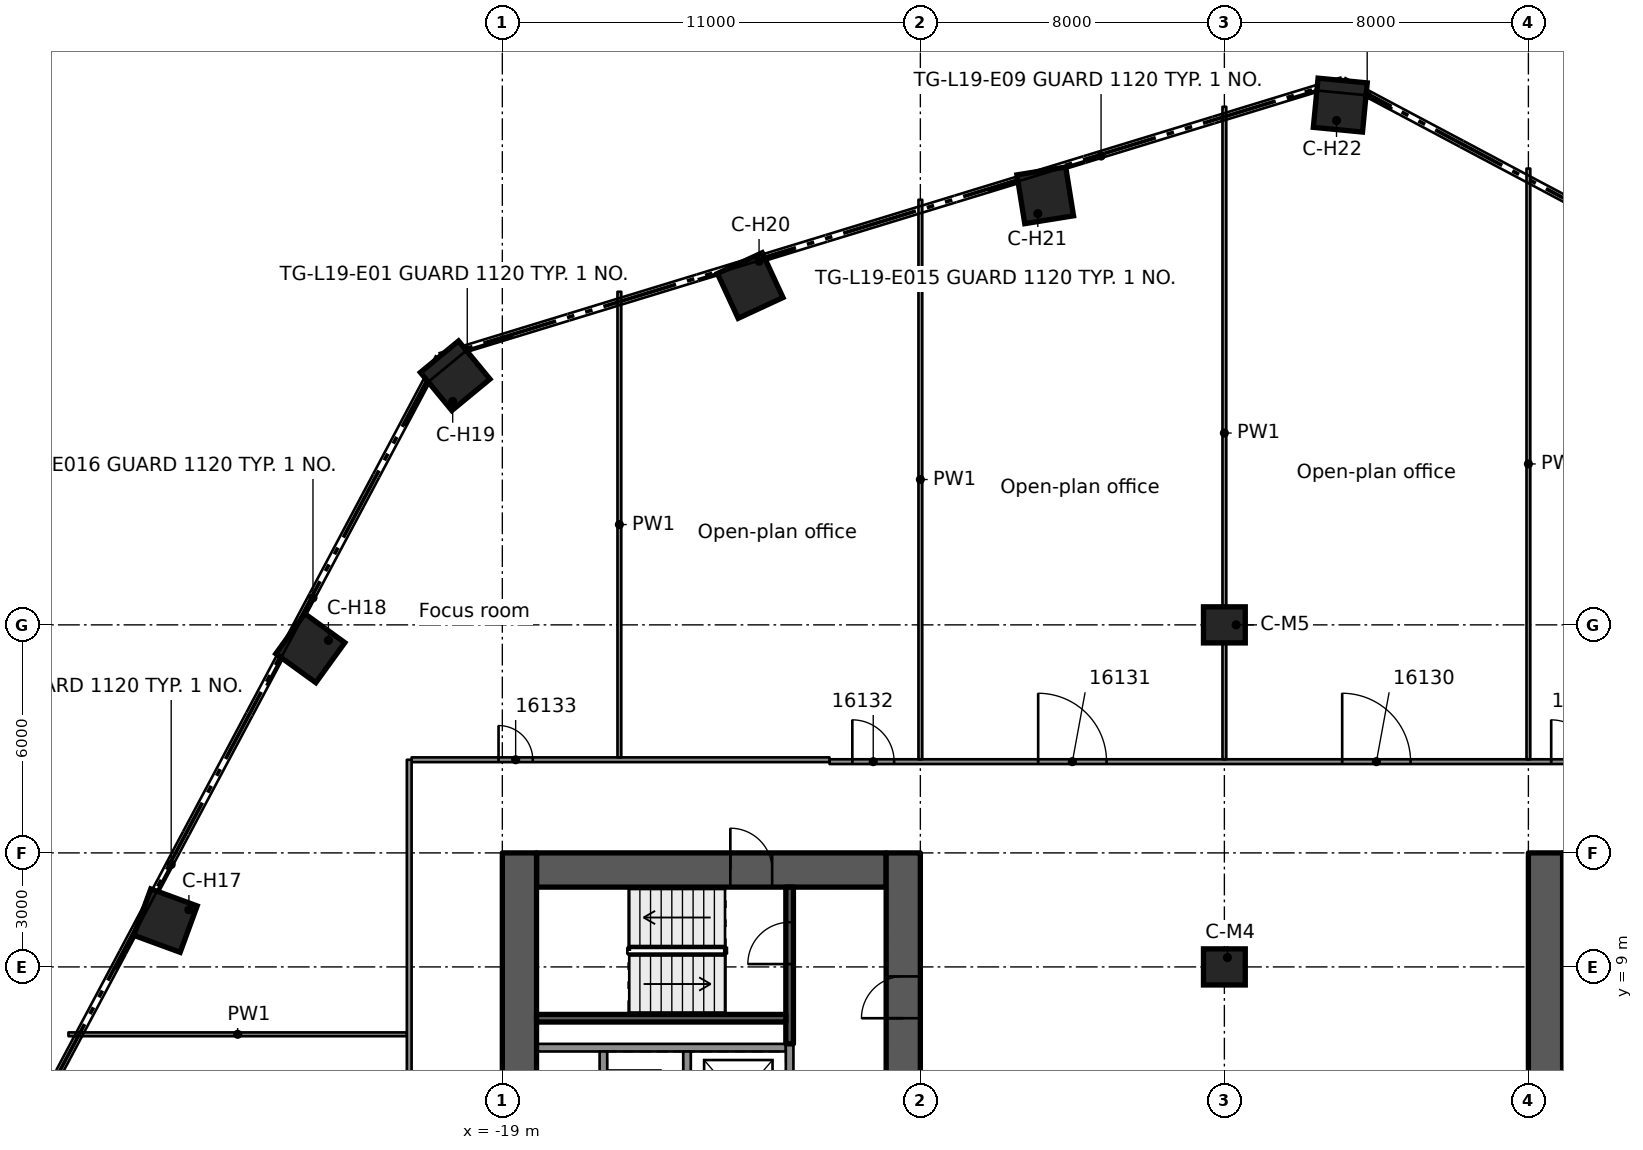
"""IFC4 building model, lengths in metres.
Left out: names, types, materials, properties, quantities, classifications, styles, units other than length and angle.
Written with IfcOpenShell. Run it as: python <this file> out.ifc"""

import sys

from ifc_helpers import new_model, si_unit, direction, frame, frame_2d, origin, origin_2d, place, context, subcontext, project, spatial, rectangle, extrude, element, fill, save


model = new_model("IFC4")
c1 = context("Model", 3, precision=1e-05, world=origin(), true_north=direction((0.0, 1.0)))
c2 = subcontext(c1, "Body", "Model", "MODEL_VIEW")
j1 = project(units=[si_unit("LENGTHUNIT", "METRE"), si_unit("PLANEANGLEUNIT", "RADIAN")], contexts=[c1])
p1 = place(None, origin())
s1 = spatial("IfcSite", under=j1, at=p1, CompositionType="ELEMENT")
p2 = place(p1, origin())
s2 = spatial("IfcBuilding", under=s1, at=p2, CompositionType="ELEMENT")
p3 = place(p2, frame((0.0, 0.0, 80.7)))
s3 = spatial("IfcBuildingStorey", under=s2, at=p3, CompositionType="ELEMENT", Elevation=80.7)
p4 = place(p3, frame((-18.1, 11.55, 0.0), z_axis=(0.0, 0.0, 1.0), x_axis=(1.0, 0.0, 0.0)))
e1 = element("IfcWall", 1, at=p4, inside=s3, PredefinedType="SHEAR", context=c2, shape_type="SweptSolid", body=[
    extrude(rectangle(XDim=9.2, YDim=0.9, at=frame_2d((4.6, 0.0))), origin(), (0.0, 0.0, 1.0), 3.5),
])
p5 = place(p4, frame((5.1, 0.0, 0.0)))
e2 = element("IfcOpeningElement", 2, at=p5, cuts=e1, PredefinedType="OPENING", context=c2, shape_type="SweptSolid", body=[
    extrude(rectangle(XDim=1.1, YDim=2.1, at=frame_2d((0.55, 1.05))), frame((0.0, 0.46, 0.0), z_axis=(0.0, -1.0, 0.0), x_axis=(1.0, 0.0, 0.0)), (0.0, 0.0, 1.0), 0.92),
])
p6 = place(p3, frame((-18.55, -12.0, 0.0), z_axis=(0.0, 0.0, 1.0), x_axis=(0.0, 1.0, 0.0)))
e3 = element("IfcWall", 3, at=p6, inside=s3, PredefinedType="SHEAR", context=c2, shape_type="SweptSolid", body=[
    extrude(rectangle(XDim=24.0, YDim=0.9, at=frame_2d((12.0, 0.0))), origin(), (0.0, 0.0, 1.0), 3.5),
])
p7 = place(p6, frame((10.1, 0.0, 0.0)))
e4 = element("IfcOpeningElement", 4, at=p7, cuts=e3, PredefinedType="OPENING", context=c2, shape_type="SweptSolid", body=[
    extrude(rectangle(XDim=1.8, YDim=2.1, at=frame_2d((0.9, 1.05))), frame((0.0, 0.46, 0.0), z_axis=(0.0, -1.0, 0.0), x_axis=(1.0, 0.0, 0.0)), (0.0, 0.0, 1.0), 0.92),
])
p8 = place(p3, frame((-8.45, -12.0, 0.0), z_axis=(0.0, 0.0, 1.0), x_axis=(0.0, 1.0, 0.0)))
e5 = element("IfcWall", 5, at=p8, inside=s3, PredefinedType="SHEAR", context=c2, shape_type="SweptSolid", body=[
    extrude(rectangle(XDim=24.0, YDim=0.9, at=frame_2d((12.0, 0.0))), origin(), (0.0, 0.0, 1.0), 3.5),
])
p9 = place(p8, frame((9.6, 0.0, 0.0)))
e6 = element("IfcOpeningElement", 6, at=p9, cuts=e5, PredefinedType="OPENING", context=c2, shape_type="SweptSolid", body=[
    extrude(rectangle(XDim=1.8, YDim=2.1, at=frame_2d((0.9, 1.05))), frame((0.0, 0.46, 0.0), z_axis=(0.0, -1.0, 0.0), x_axis=(1.0, 0.0, 0.0)), (0.0, 0.0, 1.0), 0.92),
])
p10 = place(p8, frame((19.65, 0.0, 0.0)))
e7 = element("IfcOpeningElement", 7, at=p10, cuts=e5, PredefinedType="OPENING", context=c2, shape_type="SweptSolid", body=[
    extrude(rectangle(XDim=1.1, YDim=2.1, at=frame_2d((0.55, 1.05))), frame((0.0, 0.46, 0.0), z_axis=(0.0, -1.0, 0.0), x_axis=(1.0, 0.0, 0.0)), (0.0, 0.0, 1.0), 0.92),
])
p11 = place(p3, frame((8.9, 11.55, 0.0), z_axis=(0.0, 0.0, 1.0), x_axis=(1.0, 0.0, 0.0)))
e8 = element("IfcWall", 8, at=p11, inside=s3, PredefinedType="SHEAR", context=c2, shape_type="SweptSolid", body=[
    extrude(rectangle(XDim=9.2, YDim=0.9, at=frame_2d((4.6, 0.0))), origin(), (0.0, 0.0, 1.0), 3.5),
])
p12 = place(p11, frame((3.0, 0.0, 0.0)))
e9 = element("IfcOpeningElement", 9, at=p12, cuts=e8, PredefinedType="OPENING", context=c2, shape_type="SweptSolid", body=[
    extrude(rectangle(XDim=1.1, YDim=2.1, at=frame_2d((0.55, 1.05))), frame((0.0, 0.46, 0.0), z_axis=(0.0, -1.0, 0.0), x_axis=(1.0, 0.0, 0.0)), (0.0, 0.0, 1.0), 0.92),
])
p13 = place(p3, frame((8.45, -12.0, 0.0), z_axis=(0.0, 0.0, 1.0), x_axis=(0.0, 1.0, 0.0)))
e10 = element("IfcWall", 10, at=p13, inside=s3, PredefinedType="SHEAR", context=c2, shape_type="SweptSolid", body=[
    extrude(rectangle(XDim=24.0, YDim=0.9, at=frame_2d((12.0, 0.0))), origin(), (0.0, 0.0, 1.0), 3.5),
])
p14 = place(p13, frame((12.6, 0.0, 0.0)))
e11 = element("IfcOpeningElement", 11, at=p14, cuts=e10, PredefinedType="OPENING", context=c2, shape_type="SweptSolid", body=[
    extrude(rectangle(XDim=1.8, YDim=2.1, at=frame_2d((0.9, 1.05))), frame((0.0, 0.46, 0.0), z_axis=(0.0, -1.0, 0.0), x_axis=(1.0, 0.0, 0.0)), (0.0, 0.0, 1.0), 0.92),
])
p15 = place(p13, frame((3.25, 0.0, 0.0)))
e12 = element("IfcOpeningElement", 12, at=p15, cuts=e10, PredefinedType="OPENING", context=c2, shape_type="SweptSolid", body=[
    extrude(rectangle(XDim=1.1, YDim=2.1, at=frame_2d((0.55, 1.05))), frame((0.0, 0.46, 0.0), z_axis=(0.0, -1.0, 0.0), x_axis=(1.0, 0.0, 0.0)), (0.0, 0.0, 1.0), 0.92),
])
for number, where, z_axis, x_axis in (
    (13, (-27.864, 10.218, 0.0), (0.0, 0.0, 1.0), (-0.939, 0.344, 0.0)),
    (14, (-24.053, 17.387, 0.0), (0.0, 0.0, 1.0), (-0.81, 0.586, 0.0)),
    (15, (-20.241, 24.555, 0.0), (0.0, 0.0, 1.0), (-0.636, 0.772, 0.0)),
    (16, (-12.478, 26.929, 0.0), (0.0, 0.0, 1.0), (-0.42, 0.907, 0.0)),
    (17, (-4.714, 29.302, 0.0), (0.0, 0.0, 1.0), (-0.159, 0.987, 0.0)),
    (18, (3.05, 31.676, 0.0), (0.0, 0.0, 1.0), (0.096, 0.995, 0.0)),
):
    element("IfcColumn", number, at=place(p3, frame(where, z_axis=z_axis, x_axis=x_axis)), inside=s3, PredefinedType="COLUMN", context=c2, shape_type="SweptSolid", body=[
        extrude(rectangle(XDim=1.3, YDim=1.3, at=origin_2d()), origin(), (0.0, 0.0, 1.0), 3.5),
    ])
for number, where, z_axis, x_axis in (
    (19, (0.0, 9.0, 0.0), (0.0, 0.0, 1.0), (1.0, 0.0, 0.0)),
    (20, (0.0, 18.0, 0.0), (0.0, 0.0, 1.0), (1.0, 0.0, 0.0)),
):
    element("IfcColumn", number, at=place(p3, frame(where, z_axis=z_axis, x_axis=x_axis)), inside=s3, PredefinedType="COLUMN", context=c2, shape_type="SweptSolid", body=[
        extrude(rectangle(XDim=1.1, YDim=0.95, at=origin_2d()), origin(), (0.0, 0.0, 1.0), 3.5),
    ])
p16 = place(p3, frame((-11.54, 6.875, 0.0), z_axis=(0.0, 0.0, 1.0), x_axis=(-1.0, 0.0, 0.0)))
e21 = element("IfcWall", 21, at=p16, inside=s3, PredefinedType="SOLIDWALL", context=c2, shape_type="SweptSolid", body=[
    extrude(rectangle(XDim=6.56, YDim=0.2, at=frame_2d((3.28, 0.0))), origin(), (0.0, 0.0, 1.0), 3.09),
])
p17 = place(p3, frame((-11.44, -6.975, 0.0), z_axis=(0.0, 0.0, 1.0), x_axis=(0.0, 1.0, 0.0)))
e22 = element("IfcWall", 22, at=p17, inside=s3, PredefinedType="SOLIDWALL", context=c2, shape_type="SweptSolid", body=[
    extrude(rectangle(XDim=13.95, YDim=0.2, at=frame_2d((6.975, 0.0))), origin(), (0.0, 0.0, 1.0), 3.09),
])
p18 = place(p17, frame((6.425, 0.0, 0.0)))
e23 = element("IfcOpeningElement", 23, at=p18, cuts=e22, PredefinedType="OPENING", context=c2, shape_type="SweptSolid", body=[
    extrude(rectangle(XDim=1.1, YDim=2.1, at=frame_2d((0.55, 1.05))), frame((0.0, 0.11, 0.0), z_axis=(0.0, -1.0, 0.0), x_axis=(1.0, 0.0, 0.0)), (0.0, 0.0, 1.0), 0.22),
])
p19 = place(p17, frame((9.175, 0.0, 0.0)))
e24 = element("IfcOpeningElement", 24, at=p19, cuts=e22, PredefinedType="OPENING", context=c2, shape_type="SweptSolid", body=[
    extrude(rectangle(XDim=1.1, YDim=2.1, at=frame_2d((0.55, 1.05))), frame((0.0, 0.11, 0.0), z_axis=(0.0, -1.0, 0.0), x_axis=(1.0, 0.0, 0.0)), (0.0, 0.0, 1.0), 0.22),
])
p20 = place(p17, frame((11.925, 0.0, 0.0)))
e25 = element("IfcOpeningElement", 25, at=p20, cuts=e22, PredefinedType="OPENING", context=c2, shape_type="SweptSolid", body=[
    extrude(rectangle(XDim=1.1, YDim=2.1, at=frame_2d((0.55, 1.05))), frame((0.0, 0.11, 0.0), z_axis=(0.0, -1.0, 0.0), x_axis=(1.0, 0.0, 0.0)), (0.0, 0.0, 1.0), 0.22),
])
p21 = place(p17, frame((1.075, 0.0, 0.0)))
e26 = element("IfcOpeningElement", 26, at=p21, cuts=e22, PredefinedType="OPENING", context=c2, shape_type="SweptSolid", body=[
    extrude(rectangle(XDim=0.8, YDim=2.1, at=frame_2d((0.4, 1.05))), frame((0.0, 0.11, 0.0), z_axis=(0.0, -1.0, 0.0), x_axis=(1.0, 0.0, 0.0)), (0.0, 0.0, 1.0), 0.22),
])
p22 = place(p3, frame((-14.14, 4.225, 0.0), z_axis=(0.0, 0.0, 1.0), x_axis=(0.0, 1.0, 0.0)))
e27 = element("IfcWall", 27, at=p22, inside=s3, PredefinedType="SOLIDWALL", context=c2, shape_type="SweptSolid", body=[
    extrude(rectangle(XDim=2.55, YDim=0.2, at=frame_2d((1.275, 0.0))), origin(), (0.0, 0.0, 1.0), 3.09),
])
p23 = place(p3, frame((-16.34, 4.025, 0.0), z_axis=(0.0, 0.0, 1.0), x_axis=(0.0, 1.0, 0.0)))
e28 = element("IfcWall", 28, at=p23, inside=s3, PredefinedType="SOLIDWALL", context=c2, shape_type="SweptSolid", body=[
    extrude(rectangle(XDim=2.75, YDim=0.2, at=frame_2d((1.375, 0.0))), origin(), (0.0, 0.0, 1.0), 3.09),
])
p24 = place(p23, frame((0.925, 0.0, 0.0)))
e29 = element("IfcOpeningElement", 29, at=p24, cuts=e28, PredefinedType="OPENING", context=c2, shape_type="SweptSolid", body=[
    extrude(rectangle(XDim=1.1, YDim=2.1, at=frame_2d((0.55, 1.05))), frame((0.0, 0.11, 0.0), z_axis=(0.0, -1.0, 0.0), x_axis=(1.0, 0.0, 0.0)), (0.0, 0.0, 1.0), 0.22),
])
p25 = place(p3, frame((-11.44, 6.975, 0.0), z_axis=(0.0, 0.0, 1.0), x_axis=(0.0, 1.0, 0.0)))
e30 = element("IfcWall", 30, at=p25, inside=s3, PredefinedType="SOLIDWALL", context=c2, shape_type="SweptSolid", body=[
    extrude(rectangle(XDim=4.125, YDim=0.2, at=frame_2d((2.062, 0.0))), origin(), (0.0, 0.0, 1.0), 3.09),
])
p26 = place(p25, frame((2.1, 0.0, 0.0)))
e31 = element("IfcOpeningElement", 31, at=p26, cuts=e30, PredefinedType="OPENING", context=c2, shape_type="SweptSolid", body=[
    extrude(rectangle(XDim=1.1, YDim=2.1, at=frame_2d((0.55, 1.05))), frame((0.0, 0.11, 0.0), z_axis=(0.0, -1.0, 0.0), x_axis=(1.0, 0.0, 0.0)), (0.0, 0.0, 1.0), 0.22),
])
p27 = place(p3, frame((-11.54, 7.65, 0.0), z_axis=(0.0, 0.0, 1.0), x_axis=(-1.0, 0.0, 0.0)))
e32 = element("IfcWall", 32, at=p27, inside=s3, PredefinedType="SOLIDWALL", context=c2, shape_type="SweptSolid", body=[
    extrude(rectangle(XDim=6.56, YDim=0.2, at=frame_2d((3.28, 0.0))), origin(), (0.0, 0.0, 1.0), 3.09),
])
p28 = place(p3, frame((8.9, 6.875, 0.0), z_axis=(0.0, 0.0, 1.0), x_axis=(1.0, 0.0, 0.0)))
e33 = element("IfcWall", 33, at=p28, inside=s3, PredefinedType="PARTITIONING", context=c2, shape_type="SweptSolid", body=[
    extrude(rectangle(XDim=2.44, YDim=0.2, at=frame_2d((1.22, 0.0))), origin(), (0.0, 0.0, 1.0), 3.09),
])
p29 = place(p28, frame((0.72, 0.0, 0.0)))
e34 = element("IfcOpeningElement", 34, at=p29, cuts=e33, PredefinedType="OPENING", context=c2, shape_type="SweptSolid", body=[
    extrude(rectangle(XDim=1.0, YDim=2.1, at=frame_2d((0.5, 1.05))), frame((0.0, 0.11, 0.0), z_axis=(0.0, -1.0, 0.0), x_axis=(1.0, 0.0, 0.0)), (0.0, 0.0, 1.0), 0.22),
])
p30 = place(p3, frame((-30.417, 7.227, 0.0), z_axis=(0.0, 0.0, 1.0), x_axis=(1.0, 0.0, 0.0)))
e35 = element("IfcWall", 35, at=p30, inside=s3, PredefinedType="PARTITIONING", context=c2, shape_type="SweptSolid", body=[
    extrude(rectangle(XDim=8.905, YDim=0.1, at=frame_2d((4.453, 0.0))), origin(), (0.0, 0.0, 1.0), 3.08),
])
p31 = place(p3, frame((-10.39, 14.401, 0.0), z_axis=(0.0, 0.0, 1.0), x_axis=(1.0, 0.0, 0.0)))
e36 = element("IfcWall", 36, at=p31, inside=s3, PredefinedType="PARTITIONING", context=c2, shape_type="SweptSolid", body=[
    extrude(rectangle(XDim=20.781, YDim=0.125, at=frame_2d((10.391, 0.0))), origin(), (0.0, 0.0, 1.0), 3.08),
])
p32 = place(p31, frame((18.99, 0.0, 0.0)))
e37 = element("IfcOpeningElement", 37, at=p32, cuts=e36, PredefinedType="OPENING", context=c2, shape_type="SweptSolid", body=[
    extrude(rectangle(XDim=1.1, YDim=2.1, at=frame_2d((0.55, 1.05))), frame((0.0, 0.073, 0.0), z_axis=(0.0, -1.0, 0.0), x_axis=(1.0, 0.0, 0.0)), (0.0, 0.0, 1.0), 0.145),
])
p33 = place(p31, frame((13.49, 0.0, 0.0)))
e38 = element("IfcOpeningElement", 38, at=p33, cuts=e36, PredefinedType="OPENING", context=c2, shape_type="SweptSolid", body=[
    extrude(rectangle(XDim=1.8, YDim=2.1, at=frame_2d((0.9, 1.05))), frame((0.0, 0.073, 0.0), z_axis=(0.0, -1.0, 0.0), x_axis=(1.0, 0.0, 0.0)), (0.0, 0.0, 1.0), 0.145),
])
p34 = place(p31, frame((5.49, 0.0, 0.0)))
e39 = element("IfcOpeningElement", 39, at=p34, cuts=e36, PredefinedType="OPENING", context=c2, shape_type="SweptSolid", body=[
    extrude(rectangle(XDim=1.8, YDim=2.1, at=frame_2d((0.9, 1.05))), frame((0.0, 0.073, 0.0), z_axis=(0.0, -1.0, 0.0), x_axis=(1.0, 0.0, 0.0)), (0.0, 0.0, 1.0), 0.145),
])
p35 = place(p31, frame((0.6, 0.0, 0.0)))
e40 = element("IfcOpeningElement", 40, at=p35, cuts=e36, PredefinedType="OPENING", context=c2, shape_type="SweptSolid", body=[
    extrude(rectangle(XDim=1.1, YDim=2.1, at=frame_2d((0.55, 1.05))), frame((0.0, 0.073, 0.0), z_axis=(0.0, -1.0, 0.0), x_axis=(1.0, 0.0, 0.0)), (0.0, 0.0, 1.0), 0.145),
])
p36 = place(p3, frame((-21.387, 14.451, 0.0), z_axis=(0.0, 0.0, 1.0), x_axis=(1.0, 0.0, 0.0)))
e41 = element("IfcWall", 41, at=p36, inside=s3, PredefinedType="PARTITIONING", context=c2, shape_type="SweptSolid", body=[
    extrude(rectangle(XDim=10.996, YDim=0.125, at=frame_2d((5.498, 0.0))), origin(), (0.0, 0.0, 1.0), 3.08),
])
p37 = place(p36, frame((2.288, 0.0, 0.0)))
e42 = element("IfcOpeningElement", 42, at=p37, cuts=e41, PredefinedType="OPENING", context=c2, shape_type="SweptSolid", body=[
    extrude(rectangle(XDim=0.9, YDim=2.1, at=frame_2d((0.45, 1.05))), frame((0.0, 0.073, 0.0), z_axis=(0.0, -1.0, 0.0), x_axis=(1.0, 0.0, 0.0)), (0.0, 0.0, 1.0), 0.145),
])
p38 = place(p3, frame((8.0, 14.463, 0.0), z_axis=(0.0, 0.0, 1.0), x_axis=(0.0, 1.0, 0.0)))
e43 = element("IfcWall", 43, at=p38, inside=s3, PredefinedType="PARTITIONING", context=c2, shape_type="SweptSolid", body=[
    extrude(rectangle(XDim=15.543, YDim=0.1, at=frame_2d((7.771, 0.0))), origin(), (0.0, 0.0, 1.0), 3.08),
])
p39 = place(p3, frame((0.0, 14.463, 0.0), z_axis=(0.0, 0.0, 1.0), x_axis=(0.0, 1.0, 0.0)))
e44 = element("IfcWall", 44, at=p39, inside=s3, PredefinedType="PARTITIONING", context=c2, shape_type="SweptSolid", body=[
    extrude(rectangle(XDim=17.169, YDim=0.1, at=frame_2d((8.584, 0.0))), origin(), (0.0, 0.0, 1.0), 3.08),
])
p40 = place(p3, frame((-8.0, 14.463, 0.0), z_axis=(0.0, 0.0, 1.0), x_axis=(0.0, 1.0, 0.0)))
e45 = element("IfcWall", 45, at=p40, inside=s3, PredefinedType="PARTITIONING", context=c2, shape_type="SweptSolid", body=[
    extrude(rectangle(XDim=14.723, YDim=0.1, at=frame_2d((7.362, 0.0))), origin(), (0.0, 0.0, 1.0), 3.08),
])
p41 = place(p3, frame((-15.92, 14.514, 0.0), z_axis=(0.0, 0.0, 1.0), x_axis=(0.0, 1.0, 0.0)))
e46 = element("IfcWall", 46, at=p41, inside=s3, PredefinedType="PARTITIONING", context=c2, shape_type="SweptSolid", body=[
    extrude(rectangle(XDim=12.251, YDim=0.1, at=frame_2d((6.125, 0.0))), origin(), (0.0, 0.0, 1.0), 3.08),
])
p42 = place(p3, frame((-21.45, -14.439, 0.0), z_axis=(0.0, 0.0, 1.0), x_axis=(0.0, 1.0, 0.0)))
e47 = element("IfcWall", 47, at=p42, inside=s3, PredefinedType="PARTITIONING", context=c2, shape_type="SweptSolid", body=[
    extrude(rectangle(XDim=28.89, YDim=0.125, at=frame_2d((14.445, 0.0))), origin(), (0.0, 0.0, 1.0), 3.08),
])
p43 = place(p42, frame((3.35, 0.0, 0.0)))
e48 = element("IfcOpeningElement", 48, at=p43, cuts=e47, PredefinedType="OPENING", context=c2, shape_type="SweptSolid", body=[
    extrude(rectangle(XDim=1.8, YDim=2.1, at=frame_2d((0.9, 1.05))), frame((0.0, 0.073, 0.0), z_axis=(0.0, -1.0, 0.0), x_axis=(1.0, 0.0, 0.0)), (0.0, 0.0, 1.0), 0.145),
])
p44 = place(p42, frame((17.544, 0.0, 0.0)))
e49 = element("IfcOpeningElement", 49, at=p44, cuts=e47, PredefinedType="OPENING", context=c2, shape_type="SweptSolid", body=[
    extrude(rectangle(XDim=1.1, YDim=2.1, at=frame_2d((0.55, 1.05))), frame((0.0, 0.073, 0.0), z_axis=(0.0, -1.0, 0.0), x_axis=(1.0, 0.0, 0.0)), (0.0, 0.0, 1.0), 0.145),
])
p45 = place(p42, frame((11.045, 0.0, 0.0)))
e50 = element("IfcOpeningElement", 50, at=p45, cuts=e47, PredefinedType="OPENING", context=c2, shape_type="SweptSolid", body=[
    extrude(rectangle(XDim=0.9, YDim=2.1, at=frame_2d((0.45, 1.05))), frame((0.0, 0.073, 0.0), z_axis=(0.0, -1.0, 0.0), x_axis=(1.0, 0.0, 0.0)), (0.0, 0.0, 1.0), 0.145),
])
p46 = place(p10, origin())
e51 = element("IfcDoor", 51, at=p46, inside=s3, OperationType="SINGLE_SWING_RIGHT", PredefinedType="DOOR", context=c2, shape_type="SweptSolid", body=[
    extrude(rectangle(XDim=1.1, YDim=2.1, at=frame_2d((0.55, 1.05))), frame((0.0, 0.025, 0.0), z_axis=(0.0, -1.0, 0.0), x_axis=(1.0, 0.0, 0.0)), (0.0, 0.0, 1.0), 0.05),
])
fill(e7, e51)
p47 = place(p5, origin())
e52 = element("IfcDoor", 52, at=p47, inside=s3, OperationType="SINGLE_SWING_RIGHT", PredefinedType="DOOR", context=c2, shape_type="SweptSolid", body=[
    extrude(rectangle(XDim=1.1, YDim=2.1, at=frame_2d((0.55, 1.05))), frame((0.0, 0.025, 0.0), z_axis=(0.0, -1.0, 0.0), x_axis=(1.0, 0.0, 0.0)), (0.0, 0.0, 1.0), 0.05),
])
fill(e2, e52)
p48 = place(p26, origin())
e53 = element("IfcDoor", 53, at=p48, inside=s3, OperationType="SINGLE_SWING_RIGHT", PredefinedType="DOOR", context=c2, shape_type="SweptSolid", body=[
    extrude(rectangle(XDim=1.1, YDim=2.1, at=frame_2d((0.55, 1.05))), frame((0.0, 0.025, 0.0), z_axis=(0.0, -1.0, 0.0), x_axis=(1.0, 0.0, 0.0)), (0.0, 0.0, 1.0), 0.05),
])
fill(e31, e53)
p49 = place(p32, origin())
e54 = element("IfcDoor", 54, at=p49, inside=s3, OperationType="SINGLE_SWING_RIGHT", PredefinedType="DOOR", context=c2, shape_type="SweptSolid", body=[
    extrude(rectangle(XDim=1.1, YDim=2.1, at=frame_2d((0.55, 1.05))), frame((0.0, 0.025, 0.0), z_axis=(0.0, -1.0, 0.0), x_axis=(1.0, 0.0, 0.0)), (0.0, 0.0, 1.0), 0.05),
])
fill(e37, e54)
p50 = place(p33, origin())
e55 = element("IfcDoor", 55, at=p50, inside=s3, OperationType="DOUBLE_DOOR_SINGLE_SWING", PredefinedType="DOOR", context=c2, shape_type="SweptSolid", body=[
    extrude(rectangle(XDim=1.8, YDim=2.1, at=frame_2d((0.9, 1.05))), frame((0.0, 0.025, 0.0), z_axis=(0.0, -1.0, 0.0), x_axis=(1.0, 0.0, 0.0)), (0.0, 0.0, 1.0), 0.05),
])
fill(e38, e55)
p51 = place(p34, origin())
e56 = element("IfcDoor", 56, at=p51, inside=s3, OperationType="DOUBLE_DOOR_SINGLE_SWING", PredefinedType="DOOR", context=c2, shape_type="SweptSolid", body=[
    extrude(rectangle(XDim=1.8, YDim=2.1, at=frame_2d((0.9, 1.05))), frame((0.0, 0.025, 0.0), z_axis=(0.0, -1.0, 0.0), x_axis=(1.0, 0.0, 0.0)), (0.0, 0.0, 1.0), 0.05),
])
fill(e39, e56)
p52 = place(p35, origin())
e57 = element("IfcDoor", 57, at=p52, inside=s3, OperationType="SINGLE_SWING_LEFT", PredefinedType="DOOR", context=c2, shape_type="SweptSolid", body=[
    extrude(rectangle(XDim=1.1, YDim=2.1, at=frame_2d((0.55, 1.05))), frame((0.0, 0.025, 0.0), z_axis=(0.0, -1.0, 0.0), x_axis=(1.0, 0.0, 0.0)), (0.0, 0.0, 1.0), 0.05),
])
fill(e40, e57)
p53 = place(p37, origin())
e58 = element("IfcDoor", 58, at=p53, inside=s3, OperationType="SINGLE_SWING_LEFT", PredefinedType="DOOR", context=c2, shape_type="SweptSolid", body=[
    extrude(rectangle(XDim=0.9, YDim=2.1, at=frame_2d((0.45, 1.05))), frame((0.0, 0.025, 0.0), z_axis=(0.0, -1.0, 0.0), x_axis=(1.0, 0.0, 0.0)), (0.0, 0.0, 1.0), 0.05),
])
fill(e42, e58)
save(model, sys.argv[1])
